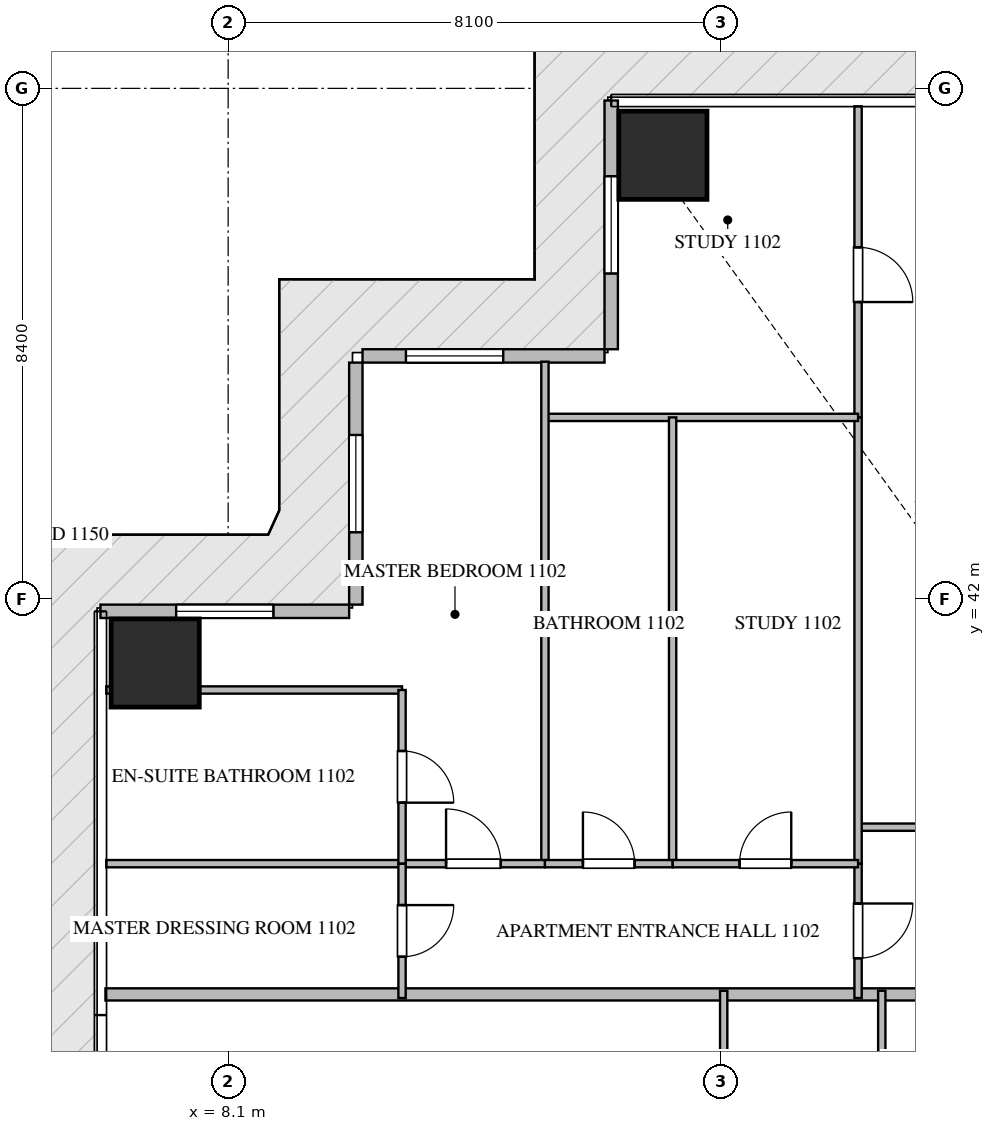
"""IFC4 building model, lengths in metres.
Left out: names, types, materials, properties, quantities, classifications, styles, units other than length and angle.
Written with IfcOpenShell. Run it as: python <this file> out.ifc"""

import sys

from ifc_helpers import new_model, si_unit, direction, frame, frame_2d, origin, origin_2d, place, context, subcontext, project, spatial, rectangle, extrude, source, transform, mapped, element, fill, save


model = new_model("IFC4")
c1 = context("Model", 3, precision=1e-05, world=origin(), true_north=direction((0.0, 1.0)))
c2 = subcontext(c1, "Body", "Model", "MODEL_VIEW")
j1 = project(units=[si_unit("LENGTHUNIT", "METRE"), si_unit("PLANEANGLEUNIT", "RADIAN")], contexts=[c1])
p1 = place(None, origin())
s1 = spatial("IfcSite", under=j1, at=p1, CompositionType="ELEMENT")
p2 = place(p1, origin())
s2 = spatial("IfcBuilding", under=s1, at=p2, CompositionType="ELEMENT")
p3 = place(p2, frame((0.0, 0.0, 49.2)))
s3 = spatial("IfcBuildingStorey", under=s2, at=p3, CompositionType="ELEMENT", Elevation=49.2)
m1 = source(origin(), c2, "Body", "SweptSolid", [
    extrude(rectangle(XDim=1.45, YDim=1.45, at=origin_2d()), origin(), (0.0, 0.0, 1.0), 3.75),
])
for number, where, z_axis, x_axis in (
    (1, (15.25, 49.3, -0.26), (0.0, 0.0, 1.0), (1.0, 0.0, 0.0)),
    (2, (6.9, 40.95, -0.26), (0.0, 0.0, 1.0), (1.0, 0.0, 0.0)),
):
    element("IfcColumn", number, at=place(p3, frame(where, z_axis=z_axis, x_axis=x_axis)), inside=s3, PredefinedType="COLUMN", context=c2, shape_type="MappedRepresentation", body=[
        mapped(m1, transform((0.0, 0.0, 0.0), scale=1.0)),
    ])
p4 = place(p3, frame((14.4, 50.2, 0.0), z_axis=(0.0, 0.0, 1.0), x_axis=(0.0, -1.0, 0.0)))
e3 = element("IfcWall", 3, at=p4, inside=s3, PredefinedType="ELEMENTEDWALL", context=c2, shape_type="SweptSolid", body=[
    extrude(rectangle(XDim=4.09, YDim=0.22, at=frame_2d((2.045, 0.0))), origin(), (0.0, 0.0, 1.0), 3.475),
])
p5 = place(p4, frame((1.245, 0.0, 0.65)))
e4 = element("IfcOpeningElement", 4, at=p5, cuts=e3, PredefinedType="OPENING", context=c2, shape_type="SweptSolid", body=[
    extrude(rectangle(XDim=1.6, YDim=2.1, at=frame_2d((0.8, 1.05))), frame((0.0, 0.12, 0.0), z_axis=(0.0, -1.0, 0.0), x_axis=(1.0, 0.0, 0.0)), (0.0, 0.0, 1.0), 0.24),
])
p6 = place(p3, frame((14.29, 46.0, 0.0), z_axis=(0.0, 0.0, 1.0), x_axis=(-1.0, 0.0, 0.0)))
e5 = element("IfcWall", 5, at=p6, inside=s3, PredefinedType="ELEMENTEDWALL", context=c2, shape_type="SweptSolid", body=[
    extrude(rectangle(XDim=3.98, YDim=0.22, at=frame_2d((1.99, 0.0))), origin(), (0.0, 0.0, 1.0), 3.475),
])
p7 = place(p6, frame((1.666, 0.0, 0.65)))
e6 = element("IfcOpeningElement", 6, at=p7, cuts=e5, PredefinedType="OPENING", context=c2, shape_type="SweptSolid", body=[
    extrude(rectangle(XDim=1.6, YDim=2.1, at=frame_2d((0.8, 1.05))), frame((0.0, 0.12, 0.0), z_axis=(0.0, -1.0, 0.0), x_axis=(1.0, 0.0, 0.0)), (0.0, 0.0, 1.0), 0.24),
])
p8 = place(p3, frame((10.2, 45.89, 0.0), z_axis=(0.0, 0.0, 1.0), x_axis=(0.0, -1.0, 0.0)))
e7 = element("IfcWall", 7, at=p8, inside=s3, PredefinedType="ELEMENTEDWALL", context=c2, shape_type="SweptSolid", body=[
    extrude(rectangle(XDim=3.98, YDim=0.22, at=frame_2d((1.99, 0.0))), origin(), (0.0, 0.0, 1.0), 3.475),
])
p9 = place(p8, frame((1.19, 0.0, 0.65)))
e8 = element("IfcOpeningElement", 8, at=p9, cuts=e7, PredefinedType="OPENING", context=c2, shape_type="SweptSolid", body=[
    extrude(rectangle(XDim=1.6, YDim=2.1, at=frame_2d((0.8, 1.05))), frame((0.0, 0.12, 0.0), z_axis=(0.0, -1.0, 0.0), x_axis=(1.0, 0.0, 0.0)), (0.0, 0.0, 1.0), 0.24),
])
p10 = place(p3, frame((10.09, 41.8, 0.0), z_axis=(0.0, 0.0, 1.0), x_axis=(-1.0, 0.0, 0.0)))
e9 = element("IfcWall", 9, at=p10, inside=s3, PredefinedType="ELEMENTEDWALL", context=c2, shape_type="SweptSolid", body=[
    extrude(rectangle(XDim=4.09, YDim=0.22, at=frame_2d((2.045, 0.0))), origin(), (0.0, 0.0, 1.0), 3.475),
])
p11 = place(p10, frame((1.245, 0.0, 0.65)))
e10 = element("IfcOpeningElement", 10, at=p11, cuts=e9, PredefinedType="OPENING", context=c2, shape_type="SweptSolid", body=[
    extrude(rectangle(XDim=1.6, YDim=2.1, at=frame_2d((0.8, 1.05))), frame((0.0, 0.12, 0.0), z_axis=(0.0, -1.0, 0.0), x_axis=(1.0, 0.0, 0.0)), (0.0, 0.0, 1.0), 0.24),
])
p12 = place(p3, frame((6.082, 35.5, 0.0), z_axis=(0.0, 0.0, 1.0), x_axis=(1.0, 0.0, 0.0)))
e11 = element("IfcWall", 11, at=p12, inside=s3, PredefinedType="PARTITIONING", context=c2, shape_type="SweptSolid", body=[
    extrude(rectangle(XDim=15.318, YDim=0.2, at=frame_2d((7.659, 0.0))), origin(), (0.0, 0.0, 1.0), 3.49),
])
p13 = place(p3, frame((18.46, 38.25, 0.0), z_axis=(0.0, 0.0, 1.0), x_axis=(1.0, 0.0, 0.0)))
e12 = element("IfcWall", 12, at=p13, inside=s3, PredefinedType="PARTITIONING", context=c2, shape_type="SweptSolid", body=[
    extrude(rectangle(XDim=2.85, YDim=0.12, at=frame_2d((1.425, 0.0))), origin(), (0.0, 0.0, 1.0), 3.49),
])
p14 = place(p13, frame((1.0, 0.0, 0.0)))
e13 = element("IfcOpeningElement", 13, at=p14, cuts=e12, PredefinedType="OPENING", context=c2, shape_type="SweptSolid", body=[
    extrude(rectangle(XDim=0.85, YDim=2.1, at=frame_2d((0.425, 1.05))), frame((0.0, 0.07, 0.0), z_axis=(0.0, -1.0, 0.0), x_axis=(1.0, 0.0, 0.0)), (0.0, 0.0, 1.0), 0.14),
])
p15 = place(p3, frame((18.46, 37.65, 0.0), z_axis=(0.0, 0.0, 1.0), x_axis=(0.0, -1.0, 0.0)))
e14 = element("IfcWall", 14, at=p15, inside=s3, PredefinedType="PARTITIONING", context=c2, shape_type="SweptSolid", body=[
    extrude(rectangle(XDim=2.21, YDim=0.12, at=frame_2d((1.105, 0.0))), origin(), (0.0, 0.0, 1.0), 3.49),
])
p16 = place(p15, frame((0.655, 0.0, 0.0)))
e15 = element("IfcOpeningElement", 15, at=p16, cuts=e14, PredefinedType="OPENING", context=c2, shape_type="SweptSolid", body=[
    extrude(rectangle(XDim=0.9, YDim=2.1, at=frame_2d((0.45, 1.05))), frame((0.0, 0.07, 0.0), z_axis=(0.0, -1.0, 0.0), x_axis=(1.0, 0.0, 0.0)), (0.0, 0.0, 1.0), 0.14),
])
p17 = place(p3, frame((18.46, 50.105, 0.0), z_axis=(0.0, 0.0, 1.0), x_axis=(0.0, -1.0, 0.0)))
e16 = element("IfcWall", 16, at=p17, inside=s3, PredefinedType="PARTITIONING", context=c2, shape_type="SweptSolid", body=[
    extrude(rectangle(XDim=5.116, YDim=0.12, at=frame_2d((2.558, 0.0))), origin(), (0.0, 0.0, 1.0), 3.49),
])
p18 = place(p17, frame((2.319, 0.0, 0.0)))
e17 = element("IfcOpeningElement", 17, at=p18, cuts=e16, PredefinedType="OPENING", context=c2, shape_type="SweptSolid", body=[
    extrude(rectangle(XDim=0.9, YDim=2.1, at=frame_2d((0.45, 1.05))), frame((0.0, 0.07, 0.0), z_axis=(0.0, -1.0, 0.0), x_axis=(1.0, 0.0, 0.0)), (0.0, 0.0, 1.0), 0.14),
])
p19 = place(p3, frame((18.46, 44.987, 0.0), z_axis=(0.0, 0.0, 1.0), x_axis=(0.0, -1.0, 0.0)))
e18 = element("IfcWall", 18, at=p19, inside=s3, PredefinedType="PARTITIONING", context=c2, shape_type="SweptSolid", body=[
    extrude(rectangle(XDim=7.335, YDim=0.12, at=frame_2d((3.667, 0.0))), origin(), (0.0, 0.0, 1.0), 3.49),
])
p20 = place(p3, frame((13.31, 44.989, 0.0), z_axis=(0.0, 0.0, 1.0), x_axis=(1.0, 0.0, 0.0)))
e19 = element("IfcWall", 19, at=p20, inside=s3, PredefinedType="PARTITIONING", context=c2, shape_type="SweptSolid", body=[
    extrude(rectangle(XDim=5.15, YDim=0.12, at=frame_2d((2.575, 0.0))), origin(), (0.0, 0.0, 1.0), 3.49),
])
p21 = place(p3, frame((13.31, 45.905, 0.0), z_axis=(0.0, 0.0, 1.0), x_axis=(0.0, -1.0, 0.0)))
e20 = element("IfcWall", 20, at=p21, inside=s3, PredefinedType="PARTITIONING", context=c2, shape_type="SweptSolid", body=[
    extrude(rectangle(XDim=8.255, YDim=0.12, at=frame_2d((4.127, 0.0))), origin(), (0.0, 0.0, 1.0), 3.49),
])
p22 = place(p3, frame((15.41, 44.989, 0.0), z_axis=(0.0, 0.0, 1.0), x_axis=(0.0, -1.0, 0.0)))
e21 = element("IfcWall", 21, at=p22, inside=s3, PredefinedType="PARTITIONING", context=c2, shape_type="SweptSolid", body=[
    extrude(rectangle(XDim=7.339, YDim=0.12, at=frame_2d((3.669, 0.0))), origin(), (0.0, 0.0, 1.0), 2.922),
])
p23 = place(p3, frame((13.31, 37.65, 0.0), z_axis=(0.0, 0.0, 1.0), x_axis=(1.0, 0.0, 0.0)))
e22 = element("IfcWall", 22, at=p23, inside=s3, PredefinedType="PARTITIONING", context=c2, shape_type="SweptSolid", body=[
    extrude(rectangle(XDim=2.1, YDim=0.12, at=frame_2d((1.05, 0.0))), origin(), (0.0, 0.0, 1.0), 3.49),
])
p24 = place(p23, frame((0.625, 0.0, 0.0)))
e23 = element("IfcOpeningElement", 23, at=p24, cuts=e22, PredefinedType="OPENING", context=c2, shape_type="SweptSolid", body=[
    extrude(rectangle(XDim=0.85, YDim=2.1, at=frame_2d((0.425, 1.05))), frame((0.0, 0.07, 0.0), z_axis=(0.0, -1.0, 0.0), x_axis=(1.0, 0.0, 0.0)), (0.0, 0.0, 1.0), 0.14),
])
p25 = place(p3, frame((15.412, 37.65, 0.0), z_axis=(0.0, 0.0, 1.0), x_axis=(1.0, 0.0, 0.0)))
e24 = element("IfcWall", 24, at=p25, inside=s3, PredefinedType="PARTITIONING", context=c2, shape_type="SweptSolid", body=[
    extrude(rectangle(XDim=3.048, YDim=0.12, at=frame_2d((1.524, 0.0))), origin(), (0.0, 0.0, 1.0), 3.49),
])
p26 = place(p25, frame((1.099, 0.0, 0.0)))
e25 = element("IfcOpeningElement", 25, at=p26, cuts=e24, PredefinedType="OPENING", context=c2, shape_type="SweptSolid", body=[
    extrude(rectangle(XDim=0.85, YDim=2.1, at=frame_2d((0.425, 1.05))), frame((0.0, 0.07, 0.0), z_axis=(0.0, -1.0, 0.0), x_axis=(1.0, 0.0, 0.0)), (0.0, 0.0, 1.0), 0.14),
])
p27 = place(p3, frame((10.96, 37.65, 0.0), z_axis=(0.0, 0.0, 1.0), x_axis=(1.0, 0.0, 0.0)))
e26 = element("IfcWall", 26, at=p27, inside=s3, PredefinedType="PARTITIONING", context=c2, shape_type="SweptSolid", body=[
    extrude(rectangle(XDim=2.348, YDim=0.12, at=frame_2d((1.174, 0.0))), origin(), (0.0, 0.0, 1.0), 3.49),
])
p28 = place(p27, frame((0.724, 0.0, 0.0)))
e27 = element("IfcOpeningElement", 27, at=p28, cuts=e26, PredefinedType="OPENING", context=c2, shape_type="SweptSolid", body=[
    extrude(rectangle(XDim=0.9, YDim=2.1, at=frame_2d((0.45, 1.05))), frame((0.0, 0.07, 0.0), z_axis=(0.0, -1.0, 0.0), x_axis=(1.0, 0.0, 0.0)), (0.0, 0.0, 1.0), 0.14),
])
p29 = place(p3, frame((6.095, 40.506, 0.0), z_axis=(0.0, 0.0, 1.0), x_axis=(1.0, 0.0, 0.0)))
e28 = element("IfcWall", 28, at=p29, inside=s3, PredefinedType="PARTITIONING", context=c2, shape_type="SweptSolid", body=[
    extrude(rectangle(XDim=4.865, YDim=0.12, at=frame_2d((2.433, 0.0))), origin(), (0.0, 0.0, 1.0), 3.49),
])
p30 = place(p3, frame((6.095, 37.65, 0.0), z_axis=(0.0, 0.0, 1.0), x_axis=(1.0, 0.0, 0.0)))
e29 = element("IfcWall", 29, at=p30, inside=s3, PredefinedType="PARTITIONING", context=c2, shape_type="SweptSolid", body=[
    extrude(rectangle(XDim=4.863, YDim=0.12, at=frame_2d((2.432, 0.0))), origin(), (0.0, 0.0, 1.0), 3.49),
])
p31 = place(p3, frame((10.96, 40.506, 0.0), z_axis=(0.0, 0.0, 1.0), x_axis=(0.0, -1.0, 0.0)))
e30 = element("IfcWall", 30, at=p31, inside=s3, PredefinedType="PARTITIONING", context=c2, shape_type="SweptSolid", body=[
    extrude(rectangle(XDim=2.856, YDim=0.12, at=frame_2d((1.428, 0.0))), origin(), (0.0, 0.0, 1.0), 3.49),
])
p32 = place(p31, frame((1.003, 0.0, 0.0)))
e31 = element("IfcOpeningElement", 31, at=p32, cuts=e30, PredefinedType="OPENING", context=c2, shape_type="SweptSolid", body=[
    extrude(rectangle(XDim=0.85, YDim=2.1, at=frame_2d((0.425, 1.05))), frame((0.0, 0.07, 0.0), z_axis=(0.0, -1.0, 0.0), x_axis=(1.0, 0.0, 0.0)), (0.0, 0.0, 1.0), 0.14),
])
p33 = place(p3, frame((10.96, 37.648, 0.0), z_axis=(0.0, 0.0, 1.0), x_axis=(0.0, -1.0, 0.0)))
e32 = element("IfcWall", 32, at=p33, inside=s3, PredefinedType="PARTITIONING", context=c2, shape_type="SweptSolid", body=[
    extrude(rectangle(XDim=2.208, YDim=0.12, at=frame_2d((1.104, 0.0))), origin(), (0.0, 0.0, 1.0), 3.49),
])
p34 = place(p33, frame((0.679, 0.0, 0.0)))
e33 = element("IfcOpeningElement", 33, at=p34, cuts=e32, PredefinedType="OPENING", context=c2, shape_type="SweptSolid", body=[
    extrude(rectangle(XDim=0.85, YDim=2.1, at=frame_2d((0.425, 1.05))), frame((0.0, 0.07, 0.0), z_axis=(0.0, -1.0, 0.0), x_axis=(1.0, 0.0, 0.0)), (0.0, 0.0, 1.0), 0.14),
])
for number, where, z_axis, x_axis in (
    (34, (18.85, 32.75, 0.0), (0.0, 0.0, 1.0), (0.0, 1.0, 0.0)),
    (35, (16.25, 32.75, 0.0), (0.0, 0.0, 1.0), (0.0, 1.0, 0.0)),
):
    element("IfcWall", number, at=place(p3, frame(where, z_axis=z_axis, x_axis=x_axis)), inside=s3, PredefinedType="PARTITIONING", context=c2, shape_type="SweptSolid", body=[
        extrude(rectangle(XDim=2.81, YDim=0.12, at=frame_2d((1.405, 0.0))), origin(), (0.0, 0.0, 1.0), 3.49),
    ])
m2 = source(origin(), c2, "Body", "SweptSolid", [
    extrude(rectangle(XDim=1.6, YDim=2.1, at=frame_2d((0.8, 1.05))), frame((0.0, 0.03, 0.0), z_axis=(0.0, -1.0, 0.0), x_axis=(1.0, 0.0, 0.0)), (0.0, 0.0, 1.0), 0.06),
])
p35 = place(p5, origin())
e36 = element("IfcWindow", 36, at=p35, inside=s3, PartitioningType="SINGLE_PANEL", PredefinedType="WINDOW", context=c2, shape_type="MappedRepresentation", body=[
    mapped(m2, transform((0.0, 0.0, 0.0), scale=1.0)),
])
fill(e4, e36)
p36 = place(p7, origin())
e37 = element("IfcWindow", 37, at=p36, inside=s3, PartitioningType="SINGLE_PANEL", PredefinedType="WINDOW", context=c2, shape_type="MappedRepresentation", body=[
    mapped(m2, transform((0.0, 0.0, 0.0), scale=1.0)),
])
fill(e6, e37)
p37 = place(p9, origin())
e38 = element("IfcWindow", 38, at=p37, inside=s3, PartitioningType="SINGLE_PANEL", PredefinedType="WINDOW", context=c2, shape_type="MappedRepresentation", body=[
    mapped(m2, transform((0.0, 0.0, 0.0), scale=1.0)),
])
fill(e8, e38)
p38 = place(p11, origin())
e39 = element("IfcWindow", 39, at=p38, inside=s3, PartitioningType="SINGLE_PANEL", PredefinedType="WINDOW", context=c2, shape_type="MappedRepresentation", body=[
    mapped(m2, transform((0.0, 0.0, 0.0), scale=1.0)),
])
fill(e10, e39)
m3 = source(origin(), c2, "Body", "SweptSolid", [
    extrude(rectangle(XDim=0.9, YDim=2.1, at=frame_2d((0.45, 1.05))), frame((0.0, 0.025, 0.0), z_axis=(0.0, -1.0, 0.0), x_axis=(1.0, 0.0, 0.0)), (0.0, 0.0, 1.0), 0.05),
])
p39 = place(p16, origin())
e40 = element("IfcDoor", 40, at=p39, inside=s3, OperationType="SINGLE_SWING_LEFT", PredefinedType="DOOR", context=c2, shape_type="MappedRepresentation", body=[
    mapped(m3, transform((0.0, 0.0, 0.0), scale=1.0)),
])
fill(e15, e40)
p40 = place(p18, origin())
e41 = element("IfcDoor", 41, at=p40, inside=s3, OperationType="SINGLE_SWING_RIGHT", PredefinedType="DOOR", context=c2, shape_type="MappedRepresentation", body=[
    mapped(m3, transform((0.0, 0.0, 0.0), scale=1.0)),
])
fill(e17, e41)
m4 = source(origin(), c2, "Body", "SweptSolid", [
    extrude(rectangle(XDim=0.85, YDim=2.1, at=frame_2d((0.425, 1.05))), frame((0.0, 0.025, 0.0), z_axis=(0.0, -1.0, 0.0), x_axis=(1.0, 0.0, 0.0)), (0.0, 0.0, 1.0), 0.05),
])
p41 = place(p24, origin())
e42 = element("IfcDoor", 42, at=p41, inside=s3, OperationType="SINGLE_SWING_LEFT", PredefinedType="DOOR", context=c2, shape_type="MappedRepresentation", body=[
    mapped(m4, transform((0.0, 0.0, 0.0), scale=1.0)),
])
fill(e23, e42)
p42 = place(p26, origin())
e43 = element("IfcDoor", 43, at=p42, inside=s3, OperationType="SINGLE_SWING_RIGHT", PredefinedType="DOOR", context=c2, shape_type="MappedRepresentation", body=[
    mapped(m4, transform((0.0, 0.0, 0.0), scale=1.0)),
])
fill(e25, e43)
p43 = place(p28, origin())
e44 = element("IfcDoor", 44, at=p43, inside=s3, OperationType="SINGLE_SWING_LEFT", PredefinedType="DOOR", context=c2, shape_type="MappedRepresentation", body=[
    mapped(m3, transform((0.0, 0.0, 0.0), scale=1.0)),
])
fill(e27, e44)
p44 = place(p32, origin())
e45 = element("IfcDoor", 45, at=p44, inside=s3, OperationType="SINGLE_SWING_RIGHT", PredefinedType="DOOR", context=c2, shape_type="MappedRepresentation", body=[
    mapped(m4, transform((0.0, 0.0, 0.0), scale=1.0)),
])
fill(e31, e45)
p45 = place(p34, origin())
e46 = element("IfcDoor", 46, at=p45, inside=s3, OperationType="SINGLE_SWING_LEFT", PredefinedType="DOOR", context=c2, shape_type="MappedRepresentation", body=[
    mapped(m4, transform((0.0, 0.0, 0.0), scale=1.0)),
])
fill(e33, e46)
save(model, sys.argv[1])
